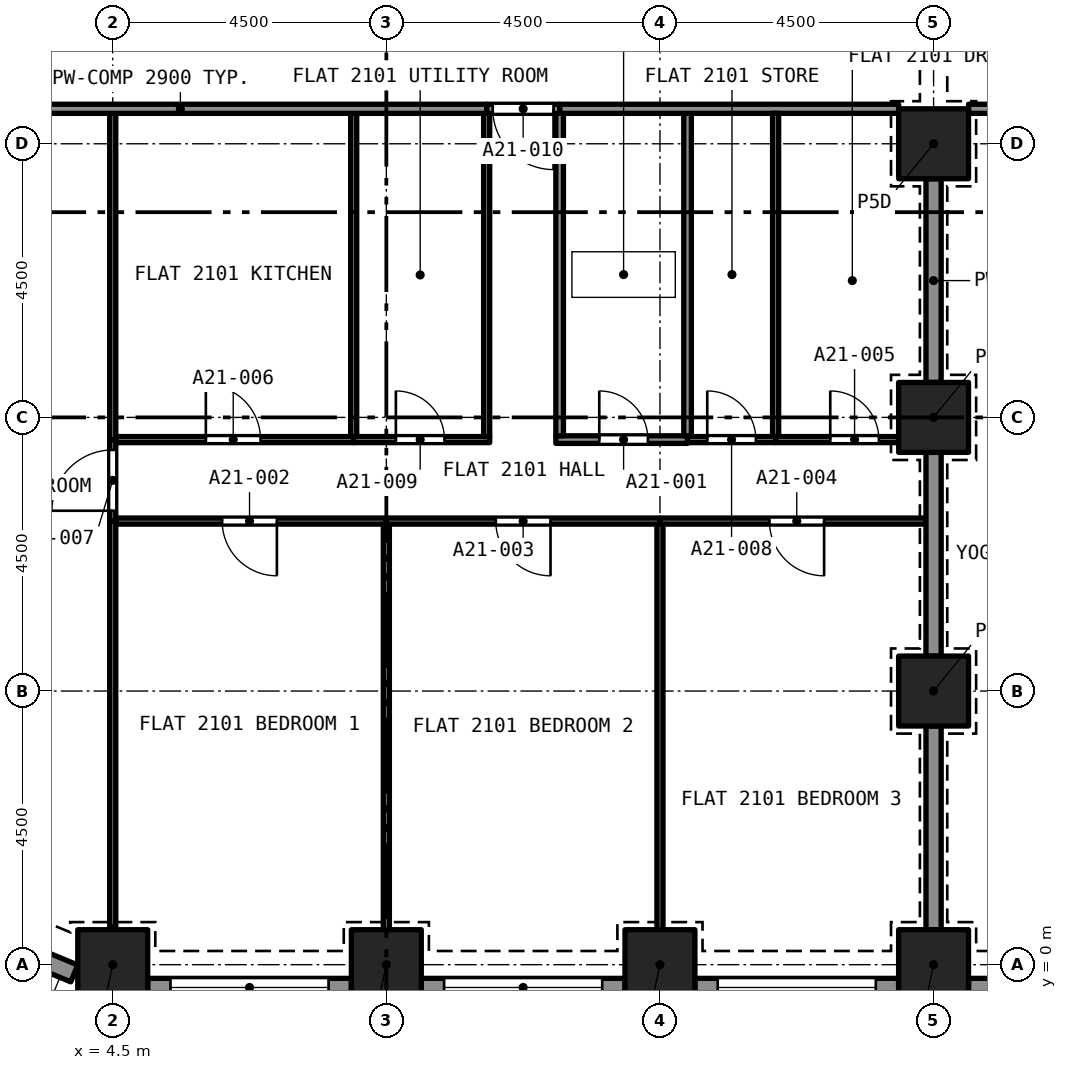
"""IFC4 building model, lengths in metres.
Left out: names, types, materials, properties, quantities, classifications, styles, units other than length and angle.
Written with IfcOpenShell. Run it as: python <this file> out.ifc"""

import sys

from ifc_helpers import new_model, si_unit, direction, frame, frame_2d, origin, origin_2d, place, context, subcontext, project, spatial, rectangle, extrude, element, fill, save


model = new_model("IFC4")
c1 = context("Model", 3, precision=1e-05, world=origin(), true_north=direction((0.0, 1.0)))
c2 = subcontext(c1, "Body", "Model", "MODEL_VIEW")
j1 = project(units=[si_unit("LENGTHUNIT", "METRE"), si_unit("PLANEANGLEUNIT", "RADIAN")], contexts=[c1])
p1 = place(None, origin())
s1 = spatial("IfcSite", under=j1, at=p1, CompositionType="ELEMENT")
p2 = place(p1, origin())
s2 = spatial("IfcBuilding", under=s1, at=p2, CompositionType="ELEMENT")
p3 = place(p2, frame((0.0, 0.0, 80.0)))
s3 = spatial("IfcBuildingStorey", under=s2, at=p3, CompositionType="ELEMENT", Elevation=80.0)
for number, where, z_axis, x_axis in (
    (1, (4.5, 0.0, 0.0), (0.0, 0.0, 1.0), (1.0, 0.0, 0.0)),
    (2, (9.0, 0.0, 0.0), (0.0, 0.0, 1.0), (1.0, 0.0, 0.0)),
    (3, (13.5, 0.0, 0.0), (0.0, 0.0, 1.0), (1.0, 0.0, 0.0)),
    (4, (18.0, 0.0, 0.0), (0.0, 0.0, 1.0), (1.0, 0.0, 0.0)),
    (5, (18.0, 4.5, 0.0), (0.0, 0.0, 1.0), (1.0, 0.0, 0.0)),
    (6, (18.0, 9.0, 0.0), (0.0, 0.0, 1.0), (1.0, 0.0, 0.0)),
    (7, (18.0, 13.5, 0.0), (0.0, 0.0, 1.0), (1.0, 0.0, 0.0)),
):
    element("IfcColumn", number, at=place(p3, frame(where, z_axis=z_axis, x_axis=x_axis)), inside=s3, PredefinedType="COLUMN", context=c2, shape_type="SweptSolid", body=[
        extrude(rectangle(XDim=1.15, YDim=1.15, at=origin_2d()), origin(), (0.0, 0.0, 1.0), 3.2),
    ])
p4 = place(p3, frame((3.868, -0.144, 0.0), z_axis=(0.0, 0.0, 1.0), x_axis=(-0.923862802911, 0.382723818695, 0.0)))
e8 = element("IfcWall", 8, at=p4, inside=s3, PredefinedType="SOLIDWALL", context=c2, shape_type="SweptSolid", body=[
    extrude(rectangle(XDim=2.164, YDim=0.3, at=frame_2d((1.082, 0.0))), origin(), (0.0, 0.0, 1.0), 3.2),
])
p5 = place(p4, frame((0.493, 0.0, 0.45)))
e9 = element("IfcOpeningElement", 9, at=p5, cuts=e8, PredefinedType="OPENING", context=c2, shape_type="SweptSolid", body=[
    extrude(rectangle(XDim=1.4, YDim=1.95, at=frame_2d((0.7, 0.975))), frame((0.0, 0.16, 0.0), z_axis=(0.0, -1.0, 0.0), x_axis=(1.0, 0.0, 0.0)), (0.0, 0.0, 1.0), 0.32),
])
p6 = place(p3, frame((8.425, -0.375, 0.0), z_axis=(0.0, 0.0, 1.0), x_axis=(-1.0, 0.0, 0.0)))
e10 = element("IfcWall", 10, at=p6, inside=s3, PredefinedType="SOLIDWALL", context=c2, shape_type="SweptSolid", body=[
    extrude(rectangle(XDim=3.35, YDim=0.3, at=frame_2d((1.675, 0.0))), origin(), (0.0, 0.0, 1.0), 3.2),
])
p7 = place(p6, frame((0.375, 0.0, 0.45)))
e11 = element("IfcOpeningElement", 11, at=p7, cuts=e10, PredefinedType="OPENING", context=c2, shape_type="SweptSolid", body=[
    extrude(rectangle(XDim=2.6, YDim=1.95, at=frame_2d((1.3, 0.975))), frame((0.0, 0.16, 0.0), z_axis=(0.0, -1.0, 0.0), x_axis=(1.0, 0.0, 0.0)), (0.0, 0.0, 1.0), 0.32),
])
p8 = place(p3, frame((12.925, -0.375, 0.0), z_axis=(0.0, 0.0, 1.0), x_axis=(-1.0, 0.0, 0.0)))
e12 = element("IfcWall", 12, at=p8, inside=s3, PredefinedType="SOLIDWALL", context=c2, shape_type="SweptSolid", body=[
    extrude(rectangle(XDim=3.35, YDim=0.3, at=frame_2d((1.675, 0.0))), origin(), (0.0, 0.0, 1.0), 3.2),
])
p9 = place(p8, frame((0.375, 0.0, 0.45)))
e13 = element("IfcOpeningElement", 13, at=p9, cuts=e12, PredefinedType="OPENING", context=c2, shape_type="SweptSolid", body=[
    extrude(rectangle(XDim=2.6, YDim=1.95, at=frame_2d((1.3, 0.975))), frame((0.0, 0.16, 0.0), z_axis=(0.0, -1.0, 0.0), x_axis=(1.0, 0.0, 0.0)), (0.0, 0.0, 1.0), 0.32),
])
p10 = place(p3, frame((17.425, -0.375, 0.0), z_axis=(0.0, 0.0, 1.0), x_axis=(-1.0, 0.0, 0.0)))
e14 = element("IfcWall", 14, at=p10, inside=s3, PredefinedType="SOLIDWALL", context=c2, shape_type="SweptSolid", body=[
    extrude(rectangle(XDim=3.35, YDim=0.3, at=frame_2d((1.675, 0.0))), origin(), (0.0, 0.0, 1.0), 3.2),
])
p11 = place(p10, frame((0.375, 0.0, 0.45)))
e15 = element("IfcOpeningElement", 15, at=p11, cuts=e14, PredefinedType="OPENING", context=c2, shape_type="SweptSolid", body=[
    extrude(rectangle(XDim=2.6, YDim=1.95, at=frame_2d((1.3, 0.975))), frame((0.0, 0.16, 0.0), z_axis=(0.0, -1.0, 0.0), x_axis=(1.0, 0.0, 0.0)), (0.0, 0.0, 1.0), 0.32),
])
p12 = place(p3, frame((21.925, -0.375, 0.0), z_axis=(0.0, 0.0, 1.0), x_axis=(-1.0, 0.0, 0.0)))
e16 = element("IfcWall", 16, at=p12, inside=s3, PredefinedType="SOLIDWALL", context=c2, shape_type="SweptSolid", body=[
    extrude(rectangle(XDim=3.35, YDim=0.3, at=frame_2d((1.675, 0.0))), origin(), (0.0, 0.0, 1.0), 3.2),
])
p13 = place(p12, frame((0.375, 0.0, 0.45)))
e17 = element("IfcOpeningElement", 17, at=p13, cuts=e16, PredefinedType="OPENING", context=c2, shape_type="SweptSolid", body=[
    extrude(rectangle(XDim=2.6, YDim=1.95, at=frame_2d((1.3, 0.975))), frame((0.0, 0.16, 0.0), z_axis=(0.0, -1.0, 0.0), x_axis=(1.0, 0.0, 0.0)), (0.0, 0.0, 1.0), 0.32),
])
p14 = place(p3, frame((11.788, 8.635, 0.0), z_axis=(0.0, 0.0, 1.0), x_axis=(1.0, 0.0, 0.0)))
e18 = element("IfcWall", 18, at=p14, inside=s3, PredefinedType="PARTITIONING", context=c2, shape_type="SweptSolid", body=[
    extrude(rectangle(XDim=2.166, YDim=0.125, at=frame_2d((1.083, 0.0))), origin(), (0.0, 0.0, 1.0), 2.9),
])
p15 = place(p14, frame((0.715, 0.0, 0.0)))
e19 = element("IfcOpeningElement", 19, at=p15, cuts=e18, PredefinedType="OPENING", context=c2, shape_type="SweptSolid", body=[
    extrude(rectangle(XDim=0.8, YDim=2.1, at=frame_2d((0.4, 1.05))), frame((0.0, 0.073, 0.0), z_axis=(0.0, -1.0, 0.0), x_axis=(1.0, 0.0, 0.0)), (0.0, 0.0, 1.0), 0.145),
])
for number, where, z_axis, x_axis in (
    (20, (11.85, 8.698, 0.0), (0.0, 0.0, 1.0), (0.0, 1.0, 0.0)),
    (21, (13.954, 8.698, 0.0), (0.0, 0.0, 1.0), (0.0, 1.0, 0.0)),
):
    element("IfcWall", number, at=place(p3, frame(where, z_axis=z_axis, x_axis=x_axis)), inside=s3, PredefinedType="PARTITIONING", context=c2, shape_type="SweptSolid", body=[
        extrude(rectangle(XDim=5.302, YDim=0.125, at=frame_2d((2.651, 0.0))), origin(), (0.0, 0.0, 1.0), 2.9),
    ])
p16 = place(p3, frame((11.85, 14.075, 0.0), z_axis=(0.0, 0.0, 1.0), x_axis=(1.0, 0.0, 0.0)))
e22 = element("IfcWall", 22, at=p16, inside=s3, PredefinedType="PARTITIONING", context=c2, shape_type="SweptSolid", body=[
    extrude(rectangle(XDim=5.575, YDim=0.15, at=frame_2d((2.788, 0.0))), origin(), (0.0, 0.0, 1.0), 2.9),
])
p17 = place(p3, frame((9.0, 0.575, 0.0), z_axis=(0.0, 0.0, 1.0), x_axis=(0.0, 1.0, 0.0)))
e23 = element("IfcWall", 23, at=p17, inside=s3, PredefinedType="PARTITIONING", context=c2, shape_type="SweptSolid", body=[
    extrude(rectangle(XDim=6.67, YDim=0.1, at=frame_2d((3.335, 0.0))), origin(), (0.0, 0.0, 1.0), 2.9),
])
p18 = place(p3, frame((9.0, 7.295, 0.0), z_axis=(0.0, 0.0, 1.0), x_axis=(-1.0, 0.0, 0.0)))
e24 = element("IfcWall", 24, at=p18, inside=s3, PredefinedType="PARTITIONING", context=c2, shape_type="SweptSolid", body=[
    extrude(rectangle(XDim=4.45, YDim=0.1, at=frame_2d((2.225, 0.0))), origin(), (0.0, 0.0, 1.0), 2.9),
])
p19 = place(p18, frame((1.8, 0.0, 0.0)))
e25 = element("IfcOpeningElement", 25, at=p19, cuts=e24, PredefinedType="OPENING", context=c2, shape_type="SweptSolid", body=[
    extrude(rectangle(XDim=0.9, YDim=2.1, at=frame_2d((0.45, 1.05))), frame((0.0, 0.06, 0.0), z_axis=(0.0, -1.0, 0.0), x_axis=(1.0, 0.0, 0.0)), (0.0, 0.0, 1.0), 0.12),
])
p20 = place(p3, frame((4.5, 0.622, 0.0), z_axis=(0.0, 0.0, 1.0), x_axis=(0.0, 1.0, 0.0)))
e26 = element("IfcWall", 26, at=p20, inside=s3, PredefinedType="PARTITIONING", context=c2, shape_type="SweptSolid", body=[
    extrude(rectangle(XDim=6.673, YDim=0.1, at=frame_2d((3.336, 0.0))), origin(), (0.0, 0.0, 1.0), 2.9),
])
p21 = place(p3, frame((13.5, 0.575, 0.0), z_axis=(0.0, 0.0, 1.0), x_axis=(0.0, 1.0, 0.0)))
e27 = element("IfcWall", 27, at=p21, inside=s3, PredefinedType="PARTITIONING", context=c2, shape_type="SweptSolid", body=[
    extrude(rectangle(XDim=6.67, YDim=0.1, at=frame_2d((3.335, 0.0))), origin(), (0.0, 0.0, 1.0), 2.9),
])
p22 = place(p3, frame((13.5, 7.295, 0.0), z_axis=(0.0, 0.0, 1.0), x_axis=(-1.0, 0.0, 0.0)))
e28 = element("IfcWall", 28, at=p22, inside=s3, PredefinedType="PARTITIONING", context=c2, shape_type="SweptSolid", body=[
    extrude(rectangle(XDim=4.5, YDim=0.1, at=frame_2d((2.25, 0.0))), origin(), (0.0, 0.0, 1.0), 2.9),
])
p23 = place(p22, frame((1.8, 0.0, 0.0)))
e29 = element("IfcOpeningElement", 29, at=p23, cuts=e28, PredefinedType="OPENING", context=c2, shape_type="SweptSolid", body=[
    extrude(rectangle(XDim=0.9, YDim=2.1, at=frame_2d((0.45, 1.05))), frame((0.0, 0.06, 0.0), z_axis=(0.0, -1.0, 0.0), x_axis=(1.0, 0.0, 0.0)), (0.0, 0.0, 1.0), 0.12),
])
p24 = place(p3, frame((17.875, 7.295, 0.0), z_axis=(0.0, 0.0, 1.0), x_axis=(-1.0, 0.0, 0.0)))
e30 = element("IfcWall", 30, at=p24, inside=s3, PredefinedType="PARTITIONING", context=c2, shape_type="SweptSolid", body=[
    extrude(rectangle(XDim=4.375, YDim=0.1, at=frame_2d((2.188, 0.0))), origin(), (0.0, 0.0, 1.0), 2.9),
])
p25 = place(p24, frame((1.675, 0.0, 0.0)))
e31 = element("IfcOpeningElement", 31, at=p25, cuts=e30, PredefinedType="OPENING", context=c2, shape_type="SweptSolid", body=[
    extrude(rectangle(XDim=0.9, YDim=2.1, at=frame_2d((0.45, 1.05))), frame((0.0, 0.06, 0.0), z_axis=(0.0, -1.0, 0.0), x_axis=(1.0, 0.0, 0.0)), (0.0, 0.0, 1.0), 0.12),
])
for number, where, z_axis, x_axis in (
    (32, (18.0, 5.075, 0.0), (0.0, 0.0, 1.0), (0.0, 1.0, 0.0)),
    (33, (18.0, 0.575, 0.0), (0.0, 0.0, 1.0), (0.0, 1.0, 0.0)),
):
    element("IfcWall", number, at=place(p3, frame(where, z_axis=z_axis, x_axis=x_axis)), inside=s3, PredefinedType="PARTITIONING", context=c2, shape_type="SweptSolid", body=[
        extrude(rectangle(XDim=3.35, YDim=0.25, at=frame_2d((1.675, 0.0))), origin(), (0.0, 0.0, 1.0), 2.38),
    ])
p26 = place(p3, frame((15.402, 8.635, 0.0), z_axis=(0.0, 0.0, 1.0), x_axis=(1.0, 0.0, 0.0)))
e34 = element("IfcWall", 34, at=p26, inside=s3, PredefinedType="PARTITIONING", context=c2, shape_type="SweptSolid", body=[
    extrude(rectangle(XDim=2.023, YDim=0.1, at=frame_2d((1.012, 0.0))), origin(), (0.0, 0.0, 1.0), 2.9),
])
p27 = place(p26, frame((0.899, 0.0, 0.0)))
e35 = element("IfcOpeningElement", 35, at=p27, cuts=e34, PredefinedType="OPENING", context=c2, shape_type="SweptSolid", body=[
    extrude(rectangle(XDim=0.8, YDim=2.1, at=frame_2d((0.4, 1.05))), frame((0.0, 0.06, 0.0), z_axis=(0.0, -1.0, 0.0), x_axis=(1.0, 0.0, 0.0)), (0.0, 0.0, 1.0), 0.12),
])
p28 = place(p3, frame((15.402, 8.685, 0.0), z_axis=(0.0, 0.0, 1.0), x_axis=(0.0, 1.0, 0.0)))
e36 = element("IfcWall", 36, at=p28, inside=s3, PredefinedType="PARTITIONING", context=c2, shape_type="SweptSolid", body=[
    extrude(rectangle(XDim=5.315, YDim=0.1, at=frame_2d((2.657, 0.0))), origin(), (0.0, 0.0, 1.0), 2.9),
])
p29 = place(p3, frame((18.0, 9.575, 0.0), z_axis=(0.0, 0.0, 1.0), x_axis=(0.0, 1.0, 0.0)))
e37 = element("IfcWall", 37, at=p29, inside=s3, PredefinedType="PARTITIONING", context=c2, shape_type="SweptSolid", body=[
    extrude(rectangle(XDim=3.35, YDim=0.25, at=frame_2d((1.675, 0.0))), origin(), (0.0, 0.0, 1.0), 2.38),
])
p30 = place(p3, frame((4.55, 8.635, 0.0), z_axis=(0.0, 0.0, 1.0), x_axis=(1.0, 0.0, 0.0)))
e38 = element("IfcWall", 38, at=p30, inside=s3, PredefinedType="PARTITIONING", context=c2, shape_type="SweptSolid", body=[
    extrude(rectangle(XDim=3.913, YDim=0.1, at=frame_2d((1.957, 0.0))), origin(), (0.0, 0.0, 1.0), 2.9),
])
p31 = place(p30, frame((1.482, 0.0, 0.0)))
e39 = element("IfcOpeningElement", 39, at=p31, cuts=e38, PredefinedType="OPENING", context=c2, shape_type="SweptSolid", body=[
    extrude(rectangle(XDim=0.9, YDim=2.1, at=frame_2d((0.45, 1.05))), frame((0.0, 0.06, 0.0), z_axis=(0.0, -1.0, 0.0), x_axis=(1.0, 0.0, 0.0)), (0.0, 0.0, 1.0), 0.12),
])
p32 = place(p3, frame((4.5, 7.295, 0.0), z_axis=(0.0, 0.0, 1.0), x_axis=(0.0, 1.0, 0.0)))
e40 = element("IfcWall", 40, at=p32, inside=s3, PredefinedType="PARTITIONING", context=c2, shape_type="SweptSolid", body=[
    extrude(rectangle(XDim=1.34, YDim=0.1, at=frame_2d((0.67, 0.0))), origin(), (0.0, 0.0, 1.0), 2.9),
])
p33 = place(p32, frame((0.17, 0.0, 0.0)))
e41 = element("IfcOpeningElement", 41, at=p33, cuts=e40, PredefinedType="OPENING", context=c2, shape_type="SweptSolid", body=[
    extrude(rectangle(XDim=1.0, YDim=2.1, at=frame_2d((0.5, 1.05))), frame((0.0, 0.06, 0.0), z_axis=(0.0, -1.0, 0.0), x_axis=(1.0, 0.0, 0.0)), (0.0, 0.0, 1.0), 0.12),
])
p34 = place(p3, frame((13.954, 8.635, 0.0), z_axis=(0.0, 0.0, 1.0), x_axis=(1.0, 0.0, 0.0)))
e42 = element("IfcWall", 42, at=p34, inside=s3, PredefinedType="PARTITIONING", context=c2, shape_type="SweptSolid", body=[
    extrude(rectangle(XDim=1.448, YDim=0.1, at=frame_2d((0.724, 0.0))), origin(), (0.0, 0.0, 1.0), 2.9),
])
p35 = place(p34, frame((0.324, 0.0, 0.0)))
e43 = element("IfcOpeningElement", 43, at=p35, cuts=e42, PredefinedType="OPENING", context=c2, shape_type="SweptSolid", body=[
    extrude(rectangle(XDim=0.8, YDim=2.1, at=frame_2d((0.4, 1.05))), frame((0.0, 0.06, 0.0), z_axis=(0.0, -1.0, 0.0), x_axis=(1.0, 0.0, 0.0)), (0.0, 0.0, 1.0), 0.12),
])
p36 = place(p3, frame((8.463, 8.635, 0.0), z_axis=(0.0, 0.0, 1.0), x_axis=(1.0, 0.0, 0.0)))
e44 = element("IfcWall", 44, at=p36, inside=s3, PredefinedType="PARTITIONING", context=c2, shape_type="SweptSolid", body=[
    extrude(rectangle(XDim=2.237, YDim=0.1, at=frame_2d((1.118, 0.0))), origin(), (0.0, 0.0, 1.0), 2.9),
])
p37 = place(p36, frame((0.693, 0.0, 0.0)))
e45 = element("IfcOpeningElement", 45, at=p37, cuts=e44, PredefinedType="OPENING", context=c2, shape_type="SweptSolid", body=[
    extrude(rectangle(XDim=0.8, YDim=2.1, at=frame_2d((0.4, 1.05))), frame((0.0, 0.06, 0.0), z_axis=(0.0, -1.0, 0.0), x_axis=(1.0, 0.0, 0.0)), (0.0, 0.0, 1.0), 0.12),
])
p38 = place(p3, frame((10.65, 8.685, 0.0), z_axis=(0.0, 0.0, 1.0), x_axis=(0.0, 1.0, 0.0)))
e46 = element("IfcWall", 46, at=p38, inside=s3, PredefinedType="PARTITIONING", context=c2, shape_type="SweptSolid", body=[
    extrude(rectangle(XDim=5.315, YDim=0.1, at=frame_2d((2.657, 0.0))), origin(), (0.0, 0.0, 1.0), 2.9),
])
p39 = place(p3, frame((11.85, 14.075, 0.0), z_axis=(0.0, 0.0, 1.0), x_axis=(-1.0, 0.0, 0.0)))
e47 = element("IfcWall", 47, at=p39, inside=s3, PredefinedType="PARTITIONING", context=c2, shape_type="SweptSolid", body=[
    extrude(rectangle(XDim=1.2, YDim=0.15, at=frame_2d((0.6, 0.0))), origin(), (0.0, 0.0, 1.0), 2.9),
])
p40 = place(p39, frame((0.1, 0.0, 0.0)))
e48 = element("IfcOpeningElement", 48, at=p40, cuts=e47, PredefinedType="OPENING", context=c2, shape_type="SweptSolid", body=[
    extrude(rectangle(XDim=1.0, YDim=2.1, at=frame_2d((0.5, 1.05))), frame((0.0, 0.085, 0.0), z_axis=(0.0, -1.0, 0.0), x_axis=(1.0, 0.0, 0.0)), (0.0, 0.0, 1.0), 0.17),
])
p41 = place(p3, frame((4.5, 8.635, 0.0), z_axis=(0.0, 0.0, 1.0), x_axis=(0.0, 1.0, 0.0)))
e49 = element("IfcWall", 49, at=p41, inside=s3, PredefinedType="PARTITIONING", context=c2, shape_type="SweptSolid", body=[
    extrude(rectangle(XDim=5.365, YDim=0.1, at=frame_2d((2.683, 0.0))), origin(), (0.0, 0.0, 1.0), 2.9),
])
p42 = place(p3, frame((8.463, 8.685, 0.0), z_axis=(0.0, 0.0, 1.0), x_axis=(0.0, 1.0, 0.0)))
e50 = element("IfcWall", 50, at=p42, inside=s3, PredefinedType="PARTITIONING", context=c2, shape_type="SweptSolid", body=[
    extrude(rectangle(XDim=5.315, YDim=0.1, at=frame_2d((2.657, 0.0))), origin(), (0.0, 0.0, 1.0), 2.9),
])
p43 = place(p3, frame((0.575, 14.075, 0.0), z_axis=(0.0, 0.0, 1.0), x_axis=(1.0, 0.0, 0.0)))
e51 = element("IfcWall", 51, at=p43, inside=s3, PredefinedType="PARTITIONING", context=c2, shape_type="SweptSolid", body=[
    extrude(rectangle(XDim=10.075, YDim=0.15, at=frame_2d((5.038, 0.0))), origin(), (0.0, 0.0, 1.0), 2.9),
])
p44 = place(p3, frame((22.5, 14.075, 0.0), z_axis=(0.0, 0.0, 1.0), x_axis=(-1.0, 0.0, 0.0)))
e52 = element("IfcWall", 52, at=p44, inside=s3, PredefinedType="PARTITIONING", context=c2, shape_type="SweptSolid", body=[
    extrude(rectangle(XDim=3.925, YDim=0.15, at=frame_2d((1.962, 0.0))), origin(), (0.0, 0.0, 1.0), 2.75),
])
p45 = place(p44, frame((1.75, 0.0, 0.0)))
e53 = element("IfcOpeningElement", 53, at=p45, cuts=e52, PredefinedType="OPENING", context=c2, shape_type="SweptSolid", body=[
    extrude(rectangle(XDim=1.0, YDim=2.1, at=frame_2d((0.5, 1.05))), frame((0.0, 0.085, 0.0), z_axis=(0.0, -1.0, 0.0), x_axis=(1.0, 0.0, 0.0)), (0.0, 0.0, 1.0), 0.17),
])
p46 = place(p7, origin())
e54 = element("IfcWindow", 54, at=p46, inside=s3, PartitioningType="SINGLE_PANEL", PredefinedType="WINDOW", context=c2, shape_type="SweptSolid", body=[
    extrude(rectangle(XDim=2.6, YDim=1.95, at=frame_2d((1.3, 0.975))), frame((0.0, 0.03, 0.0), z_axis=(0.0, -1.0, 0.0), x_axis=(1.0, 0.0, 0.0)), (0.0, 0.0, 1.0), 0.06),
])
fill(e11, e54)
p47 = place(p9, origin())
e55 = element("IfcWindow", 55, at=p47, inside=s3, PartitioningType="SINGLE_PANEL", PredefinedType="WINDOW", context=c2, shape_type="SweptSolid", body=[
    extrude(rectangle(XDim=2.6, YDim=1.95, at=frame_2d((1.3, 0.975))), frame((0.0, 0.03, 0.0), z_axis=(0.0, -1.0, 0.0), x_axis=(1.0, 0.0, 0.0)), (0.0, 0.0, 1.0), 0.06),
])
fill(e13, e55)
p48 = place(p11, origin())
e56 = element("IfcWindow", 56, at=p48, inside=s3, PartitioningType="SINGLE_PANEL", PredefinedType="WINDOW", context=c2, shape_type="SweptSolid", body=[
    extrude(rectangle(XDim=2.6, YDim=1.95, at=frame_2d((1.3, 0.975))), frame((0.0, 0.03, 0.0), z_axis=(0.0, -1.0, 0.0), x_axis=(1.0, 0.0, 0.0)), (0.0, 0.0, 1.0), 0.06),
])
fill(e15, e56)
p49 = place(p15, origin())
e57 = element("IfcDoor", 57, at=p49, inside=s3, OperationType="SINGLE_SWING_RIGHT", PredefinedType="DOOR", context=c2, shape_type="SweptSolid", body=[
    extrude(rectangle(XDim=0.8, YDim=2.1, at=frame_2d((0.4, 1.05))), frame((0.0, 0.025, 0.0), z_axis=(0.0, -1.0, 0.0), x_axis=(1.0, 0.0, 0.0)), (0.0, 0.0, 1.0), 0.05),
])
fill(e19, e57)
p50 = place(p19, origin())
e58 = element("IfcDoor", 58, at=p50, inside=s3, OperationType="SINGLE_SWING_RIGHT", PredefinedType="DOOR", context=c2, shape_type="SweptSolid", body=[
    extrude(rectangle(XDim=0.9, YDim=2.1, at=frame_2d((0.45, 1.05))), frame((0.0, 0.025, 0.0), z_axis=(0.0, -1.0, 0.0), x_axis=(1.0, 0.0, 0.0)), (0.0, 0.0, 1.0), 0.05),
])
fill(e25, e58)
p51 = place(p23, origin())
e59 = element("IfcDoor", 59, at=p51, inside=s3, OperationType="SINGLE_SWING_LEFT", PredefinedType="DOOR", context=c2, shape_type="SweptSolid", body=[
    extrude(rectangle(XDim=0.9, YDim=2.1, at=frame_2d((0.45, 1.05))), frame((0.0, 0.025, 0.0), z_axis=(0.0, -1.0, 0.0), x_axis=(1.0, 0.0, 0.0)), (0.0, 0.0, 1.0), 0.05),
])
fill(e29, e59)
p52 = place(p25, origin())
e60 = element("IfcDoor", 60, at=p52, inside=s3, OperationType="SINGLE_SWING_LEFT", PredefinedType="DOOR", context=c2, shape_type="SweptSolid", body=[
    extrude(rectangle(XDim=0.9, YDim=2.1, at=frame_2d((0.45, 1.05))), frame((0.0, 0.025, 0.0), z_axis=(0.0, -1.0, 0.0), x_axis=(1.0, 0.0, 0.0)), (0.0, 0.0, 1.0), 0.05),
])
fill(e31, e60)
p53 = place(p27, origin())
e61 = element("IfcDoor", 61, at=p53, inside=s3, OperationType="SINGLE_SWING_RIGHT", PredefinedType="DOOR", context=c2, shape_type="SweptSolid", body=[
    extrude(rectangle(XDim=0.8, YDim=2.1, at=frame_2d((0.4, 1.05))), frame((0.0, 0.025, 0.0), z_axis=(0.0, -1.0, 0.0), x_axis=(1.0, 0.0, 0.0)), (0.0, 0.0, 1.0), 0.05),
])
fill(e35, e61)
p54 = place(p31, origin())
e62 = element("IfcDoor", 62, at=p54, inside=s3, OperationType="SINGLE_SWING_LEFT", PredefinedType="DOOR", context=c2, shape_type="SweptSolid", body=[
    extrude(rectangle(XDim=0.9, YDim=2.1, at=frame_2d((0.45, 1.05))), frame((0.0, 0.025, 0.0), z_axis=(0.0, -1.0, 0.0), x_axis=(1.0, 0.0, 0.0)), (0.0, 0.0, 1.0), 0.05),
])
fill(e39, e62)
p55 = place(p33, origin())
e63 = element("IfcDoor", 63, at=p55, inside=s3, OperationType="SINGLE_SWING_RIGHT", PredefinedType="DOOR", context=c2, shape_type="SweptSolid", body=[
    extrude(rectangle(XDim=1.0, YDim=2.1, at=frame_2d((0.5, 1.05))), frame((0.0, 0.025, 0.0), z_axis=(0.0, -1.0, 0.0), x_axis=(1.0, 0.0, 0.0)), (0.0, 0.0, 1.0), 0.05),
])
fill(e41, e63)
p56 = place(p35, origin())
e64 = element("IfcDoor", 64, at=p56, inside=s3, OperationType="SINGLE_SWING_RIGHT", PredefinedType="DOOR", context=c2, shape_type="SweptSolid", body=[
    extrude(rectangle(XDim=0.8, YDim=2.1, at=frame_2d((0.4, 1.05))), frame((0.0, 0.025, 0.0), z_axis=(0.0, -1.0, 0.0), x_axis=(1.0, 0.0, 0.0)), (0.0, 0.0, 1.0), 0.05),
])
fill(e43, e64)
p57 = place(p37, origin())
e65 = element("IfcDoor", 65, at=p57, inside=s3, OperationType="SINGLE_SWING_LEFT", PredefinedType="DOOR", context=c2, shape_type="SweptSolid", body=[
    extrude(rectangle(XDim=0.8, YDim=2.1, at=frame_2d((0.4, 1.05))), frame((0.0, 0.025, 0.0), z_axis=(0.0, -1.0, 0.0), x_axis=(1.0, 0.0, 0.0)), (0.0, 0.0, 1.0), 0.05),
])
fill(e45, e65)
p58 = place(p40, origin())
e66 = element("IfcDoor", 66, at=p58, inside=s3, OperationType="SINGLE_SWING_RIGHT", PredefinedType="DOOR", context=c2, shape_type="SweptSolid", body=[
    extrude(rectangle(XDim=1.0, YDim=2.1, at=frame_2d((0.5, 1.05))), frame((0.0, 0.025, 0.0), z_axis=(0.0, -1.0, 0.0), x_axis=(1.0, 0.0, 0.0)), (0.0, 0.0, 1.0), 0.05),
])
fill(e48, e66)
save(model, sys.argv[1])
